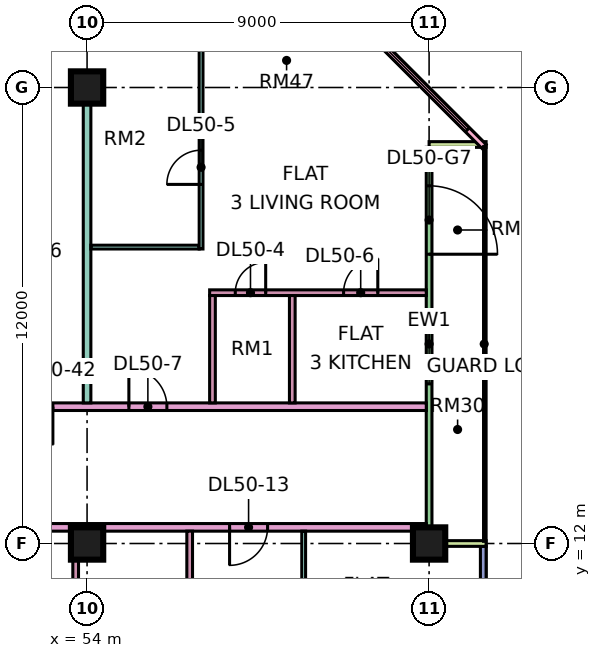
"""IFC4 building model, lengths in metres.
Left out: names, types, materials, properties, quantities, classifications, styles, units other than length and angle.
Written with IfcOpenShell. Run it as: python <this file> out.ifc"""

import sys

from ifc_helpers import new_model, si_unit, direction, frame, frame_2d, origin, origin_2d, place, context, subcontext, project, spatial, rectangle, extrude, element, fill, save


model = new_model("IFC4")
c1 = context("Model", 3, precision=1e-05, world=origin(), true_north=direction((0.0, 1.0)))
c2 = subcontext(c1, "Body", "Model", "MODEL_VIEW")
j1 = project(units=[si_unit("LENGTHUNIT", "METRE"), si_unit("PLANEANGLEUNIT", "RADIAN")], contexts=[c1])
p1 = place(None, origin())
s1 = spatial("IfcSite", under=j1, at=p1, CompositionType="ELEMENT")
p2 = place(p1, origin())
s2 = spatial("IfcBuilding", under=s1, at=p2, CompositionType="ELEMENT")
p3 = place(p2, frame((0.0, 0.0, 215.4)))
s3 = spatial("IfcBuildingStorey", under=s2, at=p3, CompositionType="ELEMENT", Elevation=215.4)
for number, where, z_axis, x_axis in (
    (1, (54.0, 12.0, 0.0), (0.0, 0.0, 1.0), (1.0, 0.0, 0.0)),
    (2, (54.0, 24.0, 0.0), (0.0, 0.0, 1.0), (1.0, 0.0, 0.0)),
    (3, (63.0, 12.0, 0.0), (0.0, 0.0, 1.0), (1.0, 0.0, 0.0)),
):
    element("IfcColumn", number, at=place(p3, frame(where, z_axis=z_axis, x_axis=x_axis)), inside=s3, PredefinedType="COLUMN", context=c2, shape_type="SweptSolid", body=[
        extrude(rectangle(XDim=0.85, YDim=0.85, at=origin_2d()), origin(), (0.0, 0.0, 1.0), 3.75),
    ])
p4 = place(p3, frame((64.425, 1.5, 0.0), z_axis=(0.0, 0.0, 1.0), x_axis=(0.0, 1.0, 0.0)))
e4 = element("IfcWall", 4, at=p4, inside=s3, PredefinedType="SOLIDWALL", context=c2, shape_type="SweptSolid", body=[
    extrude(rectangle(XDim=10.425, YDim=0.15, at=frame_2d((5.212, 0.0))), origin(), (0.0, 0.0, 1.0), 3.35),
])
p5 = place(p4, frame((0.75, 0.0, 0.45)))
e5 = element("IfcOpeningElement", 5, at=p5, cuts=e4, PredefinedType="OPENING", context=c2, shape_type="SweptSolid", body=[
    extrude(rectangle(XDim=3.0, YDim=2.4, at=frame_2d((1.5, 1.2))), frame((0.0, 0.085, 0.0), z_axis=(0.0, -1.0, 0.0), x_axis=(1.0, 0.0, 0.0)), (0.0, 0.0, 1.0), 0.17),
])
p6 = place(p3, frame((63.0, 12.075, 0.0), z_axis=(0.0, 0.0, 1.0), x_axis=(0.0, 1.0, 0.0)))
e6 = element("IfcWall", 6, at=p6, inside=s3, PredefinedType="SOLIDWALL", context=c2, shape_type="SweptSolid", body=[
    extrude(rectangle(XDim=10.35, YDim=0.15, at=frame_2d((5.175, 0.0))), origin(), (0.0, 0.0, 1.0), 3.35),
])
p7 = place(p6, frame((4.125, 0.0, 0.45)))
e7 = element("IfcOpeningElement", 7, at=p7, cuts=e6, PredefinedType="OPENING", context=c2, shape_type="SweptSolid", body=[
    extrude(rectangle(XDim=1.8, YDim=2.4, at=frame_2d((0.9, 1.2))), frame((0.0, 0.085, 0.0), z_axis=(0.0, -1.0, 0.0), x_axis=(1.0, 0.0, 0.0)), (0.0, 0.0, 1.0), 0.17),
])
p8 = place(p6, frame((7.538, 0.0, 0.0)))
e8 = element("IfcOpeningElement", 8, at=p8, cuts=e6, PredefinedType="OPENING", context=c2, shape_type="SweptSolid", body=[
    extrude(rectangle(XDim=1.8, YDim=2.4, at=frame_2d((0.9, 1.2))), frame((0.0, 0.085, 0.0), z_axis=(0.0, -1.0, 0.0), x_axis=(1.0, 0.0, 0.0)), (0.0, 0.0, 1.0), 0.17),
])
for number, where, z_axis, x_axis in (
    (9, (64.5, 12.0, 0.0), (0.0, 0.0, 1.0), (-1.0, 0.0, 0.0)),
    (10, (64.5, 22.5, 0.0), (0.0, 0.0, 1.0), (-1.0, 0.0, 0.0)),
):
    element("IfcWall", number, at=place(p3, frame(where, z_axis=z_axis, x_axis=x_axis)), inside=s3, PredefinedType="SOLIDWALL", context=c2, shape_type="SweptSolid", body=[
        extrude(rectangle(XDim=1.5, YDim=0.15, at=frame_2d((0.75, 0.0))), origin(), (0.0, 0.0, 1.0), 3.35),
    ])
p9 = place(p3, frame((64.447, 22.447, 0.0), z_axis=(0.0, 0.0, 1.0), x_axis=(-0.707106781187, 0.707106781187, 0.0)))
e11 = element("IfcWall", 11, at=p9, inside=s3, PredefinedType="SOLIDWALL", context=c2, shape_type="SweptSolid", body=[
    extrude(rectangle(XDim=4.243, YDim=0.15, at=frame_2d((2.121, 0.0))), origin(), (0.0, 0.0, 1.0), 3.35),
])
p10 = place(p9, frame((0.621, 0.0, 0.45)))
e12 = element("IfcOpeningElement", 12, at=p10, cuts=e11, PredefinedType="OPENING", context=c2, shape_type="SweptSolid", body=[
    extrude(rectangle(XDim=3.0, YDim=2.4, at=frame_2d((1.5, 1.2))), frame((0.0, 0.085, 0.0), z_axis=(0.0, -1.0, 0.0), x_axis=(1.0, 0.0, 0.0)), (0.0, 0.0, 1.0), 0.17),
])
p11 = place(p3, frame((40.65, 12.425, 0.0), z_axis=(0.0, 0.0, 1.0), x_axis=(1.0, 0.0, 0.0)))
e13 = element("IfcWall", 13, at=p11, inside=s3, PredefinedType="PARTITIONING", context=c2, shape_type="SweptSolid", body=[
    extrude(rectangle(XDim=22.276, YDim=0.2, at=frame_2d((11.138, 0.0))), origin(), (0.0, 0.0, 1.0), 3.35),
])
p12 = place(p11, frame((17.1, 0.0, 0.0)))
e14 = element("IfcOpeningElement", 14, at=p12, cuts=e13, PredefinedType="OPENING", context=c2, shape_type="SweptSolid", body=[
    extrude(rectangle(XDim=1.0, YDim=2.1, at=frame_2d((0.5, 1.05))), frame((0.0, 0.11, 0.0), z_axis=(0.0, -1.0, 0.0), x_axis=(1.0, 0.0, 0.0)), (0.0, 0.0, 1.0), 0.22),
])
p13 = place(p11, frame((1.05, 0.0, 0.0)))
e15 = element("IfcOpeningElement", 15, at=p13, cuts=e13, PredefinedType="OPENING", context=c2, shape_type="SweptSolid", body=[
    extrude(rectangle(XDim=1.0, YDim=2.1, at=frame_2d((0.5, 1.05))), frame((0.0, 0.11, 0.0), z_axis=(0.0, -1.0, 0.0), x_axis=(1.0, 0.0, 0.0)), (0.0, 0.0, 1.0), 0.22),
])
p14 = place(p3, frame((51.225, 15.6, 0.0), z_axis=(0.0, 0.0, 1.0), x_axis=(1.0, 0.0, 0.0)))
e16 = element("IfcWall", 16, at=p14, inside=s3, PredefinedType="PARTITIONING", context=c2, shape_type="SweptSolid", body=[
    extrude(rectangle(XDim=11.701, YDim=0.2, at=frame_2d((5.851, 0.0))), origin(), (0.0, 0.0, 1.0), 3.35),
])
p15 = place(p14, frame((3.875, 0.0, 0.0)))
e17 = element("IfcOpeningElement", 17, at=p15, cuts=e16, PredefinedType="OPENING", context=c2, shape_type="SweptSolid", body=[
    extrude(rectangle(XDim=1.0, YDim=2.1, at=frame_2d((0.5, 1.05))), frame((0.0, 0.11, 0.0), z_axis=(0.0, -1.0, 0.0), x_axis=(1.0, 0.0, 0.0)), (0.0, 0.0, 1.0), 0.22),
])
p16 = place(p14, frame((0.875, 0.0, 0.0)))
e18 = element("IfcOpeningElement", 18, at=p16, cuts=e16, PredefinedType="OPENING", context=c2, shape_type="SweptSolid", body=[
    extrude(rectangle(XDim=1.0, YDim=2.1, at=frame_2d((0.5, 1.05))), frame((0.0, 0.11, 0.0), z_axis=(0.0, -1.0, 0.0), x_axis=(1.0, 0.0, 0.0)), (0.0, 0.0, 1.0), 0.22),
])
p17 = place(p3, frame((53.7, 7.1, 0.0), z_axis=(0.0, 0.0, 1.0), x_axis=(0.0, 1.0, 0.0)))
e19 = element("IfcWall", 19, at=p17, inside=s3, PredefinedType="PARTITIONING", context=c2, shape_type="SweptSolid", body=[
    extrude(rectangle(XDim=5.225, YDim=0.15, at=frame_2d((2.612, 0.0))), origin(), (0.0, 0.0, 1.0), 3.35),
])
p18 = place(p3, frame((54.0, 15.7, 0.0), z_axis=(0.0, 0.0, 1.0), x_axis=(0.0, 1.0, 0.0)))
e20 = element("IfcWall", 20, at=p18, inside=s3, PredefinedType="PARTITIONING", context=c2, shape_type="SweptSolid", body=[
    extrude(rectangle(XDim=8.3, YDim=0.2, at=frame_2d((4.15, 0.0))), origin(), (0.0, 0.0, 1.0), 3.35),
])
p19 = place(p3, frame((54.1, 19.8, 0.0), z_axis=(0.0, 0.0, 1.0), x_axis=(1.0, 0.0, 0.0)))
e21 = element("IfcWall", 21, at=p19, inside=s3, PredefinedType="PARTITIONING", context=c2, shape_type="SweptSolid", body=[
    extrude(rectangle(XDim=2.85, YDim=0.1, at=frame_2d((1.425, 0.0))), origin(), (0.0, 0.0, 1.0), 3.35),
])
p20 = place(p3, frame((56.7, 7.1, 0.0), z_axis=(0.0, 0.0, 1.0), x_axis=(0.0, 1.0, 0.0)))
e22 = element("IfcWall", 22, at=p20, inside=s3, PredefinedType="PARTITIONING", context=c2, shape_type="SweptSolid", body=[
    extrude(rectangle(XDim=5.225, YDim=0.15, at=frame_2d((2.612, 0.0))), origin(), (0.0, 0.0, 1.0), 3.35),
])
p21 = place(p3, frame((57.0, 19.75, 0.0), z_axis=(0.0, 0.0, 1.0), x_axis=(0.0, 1.0, 0.0)))
e23 = element("IfcWall", 23, at=p21, inside=s3, PredefinedType="PARTITIONING", context=c2, shape_type="SweptSolid", body=[
    extrude(rectangle(XDim=5.6, YDim=0.1, at=frame_2d((2.8, 0.0))), origin(), (0.0, 0.0, 1.0), 3.35),
])
p22 = place(p21, frame((1.7, 0.0, 0.0)))
e24 = element("IfcOpeningElement", 24, at=p22, cuts=e23, PredefinedType="OPENING", context=c2, shape_type="SweptSolid", body=[
    extrude(rectangle(XDim=0.9, YDim=2.1, at=frame_2d((0.45, 1.05))), frame((0.0, 0.06, 0.0), z_axis=(0.0, -1.0, 0.0), x_axis=(1.0, 0.0, 0.0)), (0.0, 0.0, 1.0), 0.12),
])
p23 = place(p3, frame((57.225, 18.6, 0.0), z_axis=(0.0, 0.0, 1.0), x_axis=(1.0, 0.0, 0.0)))
e25 = element("IfcWall", 25, at=p23, inside=s3, PredefinedType="PARTITIONING", context=c2, shape_type="SweptSolid", body=[
    extrude(rectangle(XDim=5.701, YDim=0.15, at=frame_2d((2.851, 0.0))), origin(), (0.0, 0.0, 1.0), 3.35),
])
p24 = place(p23, frame((0.675, 0.0, 0.0)))
e26 = element("IfcOpeningElement", 26, at=p24, cuts=e25, PredefinedType="OPENING", context=c2, shape_type="SweptSolid", body=[
    extrude(rectangle(XDim=0.8, YDim=2.1, at=frame_2d((0.4, 1.05))), frame((0.0, 0.085, 0.0), z_axis=(0.0, -1.0, 0.0), x_axis=(1.0, 0.0, 0.0)), (0.0, 0.0, 1.0), 0.17),
])
p25 = place(p23, frame((3.525, 0.0, 0.0)))
e27 = element("IfcOpeningElement", 27, at=p25, cuts=e25, PredefinedType="OPENING", context=c2, shape_type="SweptSolid", body=[
    extrude(rectangle(XDim=0.9, YDim=2.1, at=frame_2d((0.45, 1.05))), frame((0.0, 0.085, 0.0), z_axis=(0.0, -1.0, 0.0), x_axis=(1.0, 0.0, 0.0)), (0.0, 0.0, 1.0), 0.17),
])
for number, where, z_axis, x_axis in (
    (28, (57.3, 15.7, 0.0), (0.0, 0.0, 1.0), (0.0, 1.0, 0.0)),
    (29, (59.4, 15.7, 0.0), (0.0, 0.0, 1.0), (0.0, 1.0, 0.0)),
):
    element("IfcWall", number, at=place(p3, frame(where, z_axis=z_axis, x_axis=x_axis)), inside=s3, PredefinedType="PARTITIONING", context=c2, shape_type="SweptSolid", body=[
        extrude(rectangle(XDim=2.825, YDim=0.15, at=frame_2d((1.413, 0.0))), origin(), (0.0, 0.0, 1.0), 3.35),
    ])
p26 = place(p3, frame((59.7, 6.975, 0.0), z_axis=(0.0, 0.0, 1.0), x_axis=(0.0, 1.0, 0.0)))
e30 = element("IfcWall", 30, at=p26, inside=s3, PredefinedType="PARTITIONING", context=c2, shape_type="SweptSolid", body=[
    extrude(rectangle(XDim=5.35, YDim=0.1, at=frame_2d((2.675, 0.0))), origin(), (0.0, 0.0, 1.0), 3.35),
])
p27 = place(p26, frame((2.3, 0.0, 0.0)))
e31 = element("IfcOpeningElement", 31, at=p27, cuts=e30, PredefinedType="OPENING", context=c2, shape_type="SweptSolid", body=[
    extrude(rectangle(XDim=0.9, YDim=2.1, at=frame_2d((0.45, 1.05))), frame((0.0, 0.06, 0.0), z_axis=(0.0, -1.0, 0.0), x_axis=(1.0, 0.0, 0.0)), (0.0, 0.0, 1.0), 0.12),
])
p28 = place(p7, origin())
e32 = element("IfcWindow", 32, at=p28, inside=s3, PartitioningType="SINGLE_PANEL", PredefinedType="WINDOW", context=c2, shape_type="SweptSolid", body=[
    extrude(rectangle(XDim=1.8, YDim=2.4, at=frame_2d((0.9, 1.2))), frame((0.0, 0.03, 0.0), z_axis=(0.0, -1.0, 0.0), x_axis=(1.0, 0.0, 0.0)), (0.0, 0.0, 1.0), 0.06),
])
fill(e7, e32)
p29 = place(p8, frame((1.8, 0.0, 0.0), z_axis=(0.0, 0.0, 1.0), x_axis=(-1.0, 0.0, 0.0)))
e33 = element("IfcDoor", 33, at=p29, inside=s3, OperationType="DOUBLE_DOOR_SINGLE_SWING", PredefinedType="DOOR", context=c2, shape_type="SweptSolid", body=[
    extrude(rectangle(XDim=1.8, YDim=2.4, at=frame_2d((0.9, 1.2))), frame((0.0, 0.025, 0.0), z_axis=(0.0, -1.0, 0.0), x_axis=(1.0, 0.0, 0.0)), (0.0, 0.0, 1.0), 0.05),
])
fill(e8, e33)
p30 = place(p10, origin())
e34 = element("IfcWindow", 34, at=p30, inside=s3, PartitioningType="SINGLE_PANEL", PredefinedType="WINDOW", context=c2, shape_type="SweptSolid", body=[
    extrude(rectangle(XDim=3.0, YDim=2.4, at=frame_2d((1.5, 1.2))), frame((0.0, 0.03, 0.0), z_axis=(0.0, -1.0, 0.0), x_axis=(1.0, 0.0, 0.0)), (0.0, 0.0, 1.0), 0.06),
])
fill(e12, e34)
p31 = place(p24, frame((0.8, 0.0, 0.0), z_axis=(0.0, 0.0, 1.0), x_axis=(-1.0, 0.0, 0.0)))
e35 = element("IfcDoor", 35, at=p31, inside=s3, OperationType="SINGLE_SWING_RIGHT", PredefinedType="DOOR", context=c2, shape_type="SweptSolid", body=[
    extrude(rectangle(XDim=0.8, YDim=2.1, at=frame_2d((0.4, 1.05))), frame((0.0, 0.025, 0.0), z_axis=(0.0, -1.0, 0.0), x_axis=(1.0, 0.0, 0.0)), (0.0, 0.0, 1.0), 0.05),
])
fill(e26, e35)
p32 = place(p22, origin())
e36 = element("IfcDoor", 36, at=p32, inside=s3, OperationType="SINGLE_SWING_LEFT", PredefinedType="DOOR", context=c2, shape_type="SweptSolid", body=[
    extrude(rectangle(XDim=0.9, YDim=2.1, at=frame_2d((0.45, 1.05))), frame((0.0, 0.025, 0.0), z_axis=(0.0, -1.0, 0.0), x_axis=(1.0, 0.0, 0.0)), (0.0, 0.0, 1.0), 0.05),
])
fill(e24, e36)
p33 = place(p25, frame((0.9, 0.0, 0.0), z_axis=(0.0, 0.0, 1.0), x_axis=(-1.0, 0.0, 0.0)))
e37 = element("IfcDoor", 37, at=p33, inside=s3, OperationType="SINGLE_SWING_RIGHT", PredefinedType="DOOR", context=c2, shape_type="SweptSolid", body=[
    extrude(rectangle(XDim=0.9, YDim=2.1, at=frame_2d((0.45, 1.05))), frame((0.0, 0.025, 0.0), z_axis=(0.0, -1.0, 0.0), x_axis=(1.0, 0.0, 0.0)), (0.0, 0.0, 1.0), 0.05),
])
fill(e27, e37)
p34 = place(p15, origin())
e38 = element("IfcDoor", 38, at=p34, inside=s3, OperationType="SINGLE_SWING_LEFT", PredefinedType="DOOR", context=c2, shape_type="SweptSolid", body=[
    extrude(rectangle(XDim=1.0, YDim=2.1, at=frame_2d((0.5, 1.05))), frame((0.0, 0.025, 0.0), z_axis=(0.0, -1.0, 0.0), x_axis=(1.0, 0.0, 0.0)), (0.0, 0.0, 1.0), 0.05),
])
fill(e17, e38)
p35 = place(p12, frame((1.0, 0.0, 0.0), z_axis=(0.0, 0.0, 1.0), x_axis=(-1.0, 0.0, 0.0)))
e39 = element("IfcDoor", 39, at=p35, inside=s3, OperationType="SINGLE_SWING_LEFT", PredefinedType="DOOR", context=c2, shape_type="SweptSolid", body=[
    extrude(rectangle(XDim=1.0, YDim=2.1, at=frame_2d((0.5, 1.05))), frame((0.0, 0.025, 0.0), z_axis=(0.0, -1.0, 0.0), x_axis=(1.0, 0.0, 0.0)), (0.0, 0.0, 1.0), 0.05),
])
fill(e14, e39)
p36 = place(p16, origin())
e40 = element("IfcDoor", 40, at=p36, inside=s3, OperationType="SINGLE_SWING_RIGHT", PredefinedType="DOOR", context=c2, shape_type="SweptSolid", body=[
    extrude(rectangle(XDim=1.0, YDim=2.1, at=frame_2d((0.5, 1.05))), frame((0.0, 0.025, 0.0), z_axis=(0.0, -1.0, 0.0), x_axis=(1.0, 0.0, 0.0)), (0.0, 0.0, 1.0), 0.05),
])
fill(e18, e40)
save(model, sys.argv[1])
